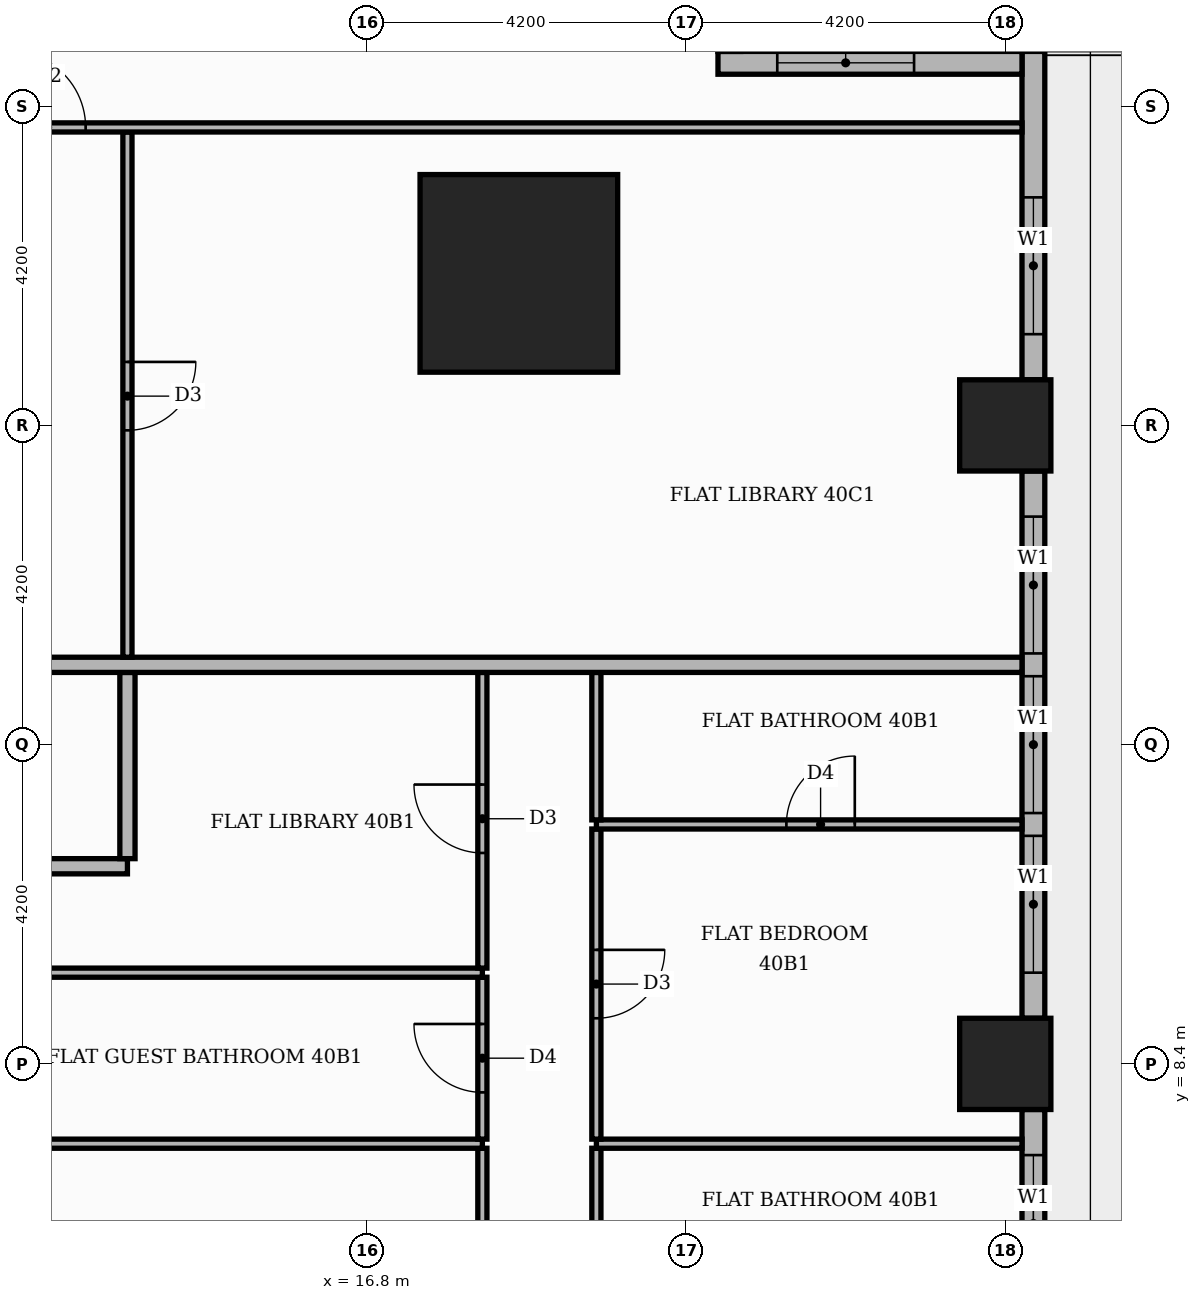
"""IFC4 building model, lengths in metres.
Left out: names, types, materials, properties, quantities, classifications, styles, units other than length and angle.
Written with IfcOpenShell. Run it as: python <this file> out.ifc"""

import sys

from ifc_helpers import new_model, si_unit, direction, frame, frame_2d, origin, origin_2d, place, context, subcontext, project, spatial, rectangle, extrude, element, fill, save


model = new_model("IFC4")
c1 = context("Model", 3, precision=1e-05, world=origin(), true_north=direction((0.0, 1.0)))
c2 = subcontext(c1, "Body", "Model", "MODEL_VIEW")
j1 = project(units=[si_unit("LENGTHUNIT", "METRE"), si_unit("PLANEANGLEUNIT", "RADIAN")], contexts=[c1])
p1 = place(None, origin())
s1 = spatial("IfcSite", under=j1, at=p1, CompositionType="ELEMENT")
p2 = place(p1, origin())
s2 = spatial("IfcBuilding", under=s1, at=p2, CompositionType="ELEMENT")
p3 = place(p2, frame((0.0, 0.0, 168.9)))
s3 = spatial("IfcBuildingStorey", under=s2, at=p3, CompositionType="ELEMENT", Elevation=168.9)
p4 = place(p3, frame((18.8, 18.8, 0.0), z_axis=(0.0, 0.0, 1.0), x_axis=(1.0, 0.0, 0.0)))
e1 = element("IfcColumn", 1, at=p4, inside=s3, PredefinedType="COLUMN", context=c2, shape_type="SweptSolid", body=[
    extrude(rectangle(XDim=2.6, YDim=2.6, at=origin_2d()), origin(), (0.0, 0.0, 1.0), 3.9),
])
for number, where, z_axis, x_axis in (
    (2, (25.2, 8.4, 0.0), (0.0, 0.0, 1.0), (1.0, 0.0, 0.0)),
    (3, (25.2, 16.8, 0.0), (0.0, 0.0, 1.0), (1.0, 0.0, 0.0)),
):
    element("IfcColumn", number, at=place(p3, frame(where, z_axis=z_axis, x_axis=x_axis)), inside=s3, PredefinedType="COLUMN", context=c2, shape_type="SweptSolid", body=[
        extrude(rectangle(XDim=1.2, YDim=1.2, at=origin_2d()), origin(), (0.0, 0.0, 1.0), 3.9),
    ])
p5 = place(p3, frame((25.57, 0.6, 0.0), z_axis=(0.0, 0.0, 1.0), x_axis=(0.0, 1.0, 0.0)))
e4 = element("IfcWall", 4, at=p5, inside=s3, PredefinedType="STANDARD", context=c2, shape_type="SweptSolid", body=[
    extrude(rectangle(XDim=7.2, YDim=0.3, at=frame_2d((3.6, 0.0))), origin(), (0.0, 0.0, 1.0), 3.48),
])
p6 = place(p5, frame((0.6, 0.0, 0.9)))
e5 = element("IfcOpeningElement", 5, at=p6, cuts=e4, PredefinedType="OPENING", context=c2, shape_type="SweptSolid", body=[
    extrude(rectangle(XDim=3.9, YDim=2.1, at=frame_2d((1.95, 1.05))), frame((0.0, 0.16, 0.0), z_axis=(0.0, -1.0, 0.0), x_axis=(1.0, 0.0, 0.0)), (0.0, 0.0, 1.0), 0.32),
])
p7 = place(p5, frame((4.8, 0.0, 0.9)))
e6 = element("IfcOpeningElement", 6, at=p7, cuts=e4, PredefinedType="OPENING", context=c2, shape_type="SweptSolid", body=[
    extrude(rectangle(XDim=1.8, YDim=2.1, at=frame_2d((0.9, 1.05))), frame((0.0, 0.16, 0.0), z_axis=(0.0, -1.0, 0.0), x_axis=(1.0, 0.0, 0.0)), (0.0, 0.0, 1.0), 0.32),
])
p8 = place(p3, frame((25.57, 9.0, 0.0), z_axis=(0.0, 0.0, 1.0), x_axis=(0.0, 1.0, 0.0)))
e7 = element("IfcWall", 7, at=p8, inside=s3, PredefinedType="STANDARD", context=c2, shape_type="SweptSolid", body=[
    extrude(rectangle(XDim=7.2, YDim=0.3, at=frame_2d((3.6, 0.0))), origin(), (0.0, 0.0, 1.0), 3.48),
])
p9 = place(p8, frame((0.6, 0.0, 0.9)))
e8 = element("IfcOpeningElement", 8, at=p9, cuts=e7, PredefinedType="OPENING", context=c2, shape_type="SweptSolid", body=[
    extrude(rectangle(XDim=1.8, YDim=2.1, at=frame_2d((0.9, 1.05))), frame((0.0, 0.16, 0.0), z_axis=(0.0, -1.0, 0.0), x_axis=(1.0, 0.0, 0.0)), (0.0, 0.0, 1.0), 0.32),
])
p10 = place(p8, frame((2.7, 0.0, 0.9)))
e9 = element("IfcOpeningElement", 9, at=p10, cuts=e7, PredefinedType="OPENING", context=c2, shape_type="SweptSolid", body=[
    extrude(rectangle(XDim=1.8, YDim=2.1, at=frame_2d((0.9, 1.05))), frame((0.0, 0.16, 0.0), z_axis=(0.0, -1.0, 0.0), x_axis=(1.0, 0.0, 0.0)), (0.0, 0.0, 1.0), 0.32),
])
p11 = place(p8, frame((4.8, 0.0, 0.9)))
e10 = element("IfcOpeningElement", 10, at=p11, cuts=e7, PredefinedType="OPENING", context=c2, shape_type="SweptSolid", body=[
    extrude(rectangle(XDim=1.8, YDim=2.1, at=frame_2d((0.9, 1.05))), frame((0.0, 0.16, 0.0), z_axis=(0.0, -1.0, 0.0), x_axis=(1.0, 0.0, 0.0)), (0.0, 0.0, 1.0), 0.32),
])
p12 = place(p3, frame((25.57, 17.4, 0.0), z_axis=(0.0, 0.0, 1.0), x_axis=(0.0, 1.0, 0.0)))
e11 = element("IfcWall", 11, at=p12, inside=s3, PredefinedType="STANDARD", context=c2, shape_type="SweptSolid", body=[
    extrude(rectangle(XDim=4.32, YDim=0.3, at=frame_2d((2.16, 0.0))), origin(), (0.0, 0.0, 1.0), 3.48),
])
p13 = place(p12, frame((0.6, 0.0, 0.9)))
e12 = element("IfcOpeningElement", 12, at=p13, cuts=e11, PredefinedType="OPENING", context=c2, shape_type="SweptSolid", body=[
    extrude(rectangle(XDim=1.8, YDim=2.1, at=frame_2d((0.9, 1.05))), frame((0.0, 0.16, 0.0), z_axis=(0.0, -1.0, 0.0), x_axis=(1.0, 0.0, 0.0)), (0.0, 0.0, 1.0), 0.32),
])
p14 = place(p3, frame((25.42, 21.57, 0.0), z_axis=(0.0, 0.0, 1.0), x_axis=(-1.0, 0.0, 0.0)))
e13 = element("IfcWall", 13, at=p14, inside=s3, PredefinedType="STANDARD", context=c2, shape_type="SweptSolid", body=[
    extrude(rectangle(XDim=4.0, YDim=0.3, at=frame_2d((2.0, 0.0))), origin(), (0.0, 0.0, 1.0), 3.48),
])
p15 = place(p14, frame((1.42, 0.0, 0.9)))
e14 = element("IfcOpeningElement", 14, at=p15, cuts=e13, PredefinedType="OPENING", context=c2, shape_type="SweptSolid", body=[
    extrude(rectangle(XDim=1.8, YDim=2.1, at=frame_2d((0.9, 1.05))), frame((0.0, 0.16, 0.0), z_axis=(0.0, -1.0, 0.0), x_axis=(1.0, 0.0, 0.0)), (0.0, 0.0, 1.0), 0.32),
])
p16 = place(p3, frame((18.32, 3.21, 0.0), z_axis=(0.0, 0.0, 1.0), x_axis=(0.0, 1.0, 0.0)))
e15 = element("IfcWall", 15, at=p16, inside=s3, PredefinedType="PARTITIONING", context=c2, shape_type="SweptSolid", body=[
    extrude(rectangle(XDim=4.08, YDim=0.12, at=frame_2d((2.04, 0.0))), origin(), (0.0, 0.0, 1.0), 3.48),
])
p17 = place(p16, frame((1.59, 0.0, 0.0)))
e16 = element("IfcOpeningElement", 16, at=p17, cuts=e15, PredefinedType="OPENING", context=c2, shape_type="SweptSolid", body=[
    extrude(rectangle(XDim=0.9, YDim=2.1, at=frame_2d((0.45, 1.05))), frame((0.0, 0.07, 0.0), z_axis=(0.0, -1.0, 0.0), x_axis=(1.0, 0.0, 0.0)), (0.0, 0.0, 1.0), 0.14),
])
p18 = place(p3, frame((19.82, 5.31, 0.0), z_axis=(0.0, 0.0, 1.0), x_axis=(0.0, 1.0, 0.0)))
e17 = element("IfcWall", 17, at=p18, inside=s3, PredefinedType="PARTITIONING", context=c2, shape_type="SweptSolid", body=[
    extrude(rectangle(XDim=1.98, YDim=0.12, at=frame_2d((0.99, 0.0))), origin(), (0.0, 0.0, 1.0), 3.48),
])
p19 = place(p3, frame((11.0, 7.35, 0.0), z_axis=(0.0, 0.0, 1.0), x_axis=(1.0, 0.0, 0.0)))
e18 = element("IfcWall", 18, at=p19, inside=s3, PredefinedType="PARTITIONING", context=c2, shape_type="SweptSolid", body=[
    extrude(rectangle(XDim=7.32, YDim=0.12, at=frame_2d((3.66, 0.0))), origin(), (0.0, 0.0, 1.0), 3.48),
])
p20 = place(p3, frame((19.82, 7.35, 0.0), z_axis=(0.0, 0.0, 1.0), x_axis=(1.0, 0.0, 0.0)))
e19 = element("IfcWall", 19, at=p20, inside=s3, PredefinedType="PARTITIONING", context=c2, shape_type="SweptSolid", body=[
    extrude(rectangle(XDim=5.6, YDim=0.12, at=frame_2d((2.8, 0.0))), origin(), (0.0, 0.0, 1.0), 3.48),
])
p21 = place(p3, frame((18.32, 7.41, 0.0), z_axis=(0.0, 0.0, 1.0), x_axis=(0.0, 1.0, 0.0)))
e20 = element("IfcWall", 20, at=p21, inside=s3, PredefinedType="PARTITIONING", context=c2, shape_type="SweptSolid", body=[
    extrude(rectangle(XDim=2.13, YDim=0.12, at=frame_2d((1.065, 0.0))), origin(), (0.0, 0.0, 1.0), 3.48),
])
p22 = place(p21, frame((0.615, 0.0, 0.0)))
e21 = element("IfcOpeningElement", 21, at=p22, cuts=e20, PredefinedType="OPENING", context=c2, shape_type="SweptSolid", body=[
    extrude(rectangle(XDim=0.9, YDim=2.1, at=frame_2d((0.45, 1.05))), frame((0.0, 0.07, 0.0), z_axis=(0.0, -1.0, 0.0), x_axis=(1.0, 0.0, 0.0)), (0.0, 0.0, 1.0), 0.14),
])
p23 = place(p3, frame((19.82, 7.41, 0.0), z_axis=(0.0, 0.0, 1.0), x_axis=(0.0, 1.0, 0.0)))
e22 = element("IfcWall", 22, at=p23, inside=s3, PredefinedType="PARTITIONING", context=c2, shape_type="SweptSolid", body=[
    extrude(rectangle(XDim=4.08, YDim=0.12, at=frame_2d((2.04, 0.0))), origin(), (0.0, 0.0, 1.0), 3.48),
])
p24 = place(p23, frame((1.59, 0.0, 0.0)))
e23 = element("IfcOpeningElement", 23, at=p24, cuts=e22, PredefinedType="OPENING", context=c2, shape_type="SweptSolid", body=[
    extrude(rectangle(XDim=0.9, YDim=2.1, at=frame_2d((0.45, 1.05))), frame((0.0, 0.07, 0.0), z_axis=(0.0, -1.0, 0.0), x_axis=(1.0, 0.0, 0.0)), (0.0, 0.0, 1.0), 0.14),
])
p25 = place(p3, frame((11.0, 9.6, 0.0), z_axis=(0.0, 0.0, 1.0), x_axis=(1.0, 0.0, 0.0)))
e24 = element("IfcWall", 24, at=p25, inside=s3, PredefinedType="PARTITIONING", context=c2, shape_type="SweptSolid", body=[
    extrude(rectangle(XDim=7.32, YDim=0.12, at=frame_2d((3.66, 0.0))), origin(), (0.0, 0.0, 1.0), 3.48),
])
p26 = place(p3, frame((18.32, 9.66, 0.0), z_axis=(0.0, 0.0, 1.0), x_axis=(0.0, 1.0, 0.0)))
e25 = element("IfcWall", 25, at=p26, inside=s3, PredefinedType="PARTITIONING", context=c2, shape_type="SweptSolid", body=[
    extrude(rectangle(XDim=3.89, YDim=0.12, at=frame_2d((1.945, 0.0))), origin(), (0.0, 0.0, 1.0), 3.48),
])
p27 = place(p26, frame((1.515, 0.0, 0.0)))
e26 = element("IfcOpeningElement", 26, at=p27, cuts=e25, PredefinedType="OPENING", context=c2, shape_type="SweptSolid", body=[
    extrude(rectangle(XDim=0.9, YDim=2.1, at=frame_2d((0.45, 1.05))), frame((0.0, 0.07, 0.0), z_axis=(0.0, -1.0, 0.0), x_axis=(1.0, 0.0, 0.0)), (0.0, 0.0, 1.0), 0.14),
])
p28 = place(p3, frame((11.0, 11.0, 0.0), z_axis=(0.0, 0.0, 1.0), x_axis=(1.0, 0.0, 0.0)))
e27 = element("IfcWall", 27, at=p28, inside=s3, PredefinedType="PARTITIONING", context=c2, shape_type="SweptSolid", body=[
    extrude(rectangle(XDim=2.65, YDim=0.2, at=frame_2d((1.325, 0.0))), origin(), (0.0, 0.0, 1.0), 3.48),
])
p29 = place(p3, frame((13.65, 11.1, 0.0), z_axis=(0.0, 0.0, 1.0), x_axis=(0.0, 1.0, 0.0)))
e28 = element("IfcWall", 28, at=p29, inside=s3, PredefinedType="PARTITIONING", context=c2, shape_type="SweptSolid", body=[
    extrude(rectangle(XDim=2.45, YDim=0.2, at=frame_2d((1.225, 0.0))), origin(), (0.0, 0.0, 1.0), 3.48),
])
p30 = place(p3, frame((19.82, 11.55, 0.0), z_axis=(0.0, 0.0, 1.0), x_axis=(1.0, 0.0, 0.0)))
e29 = element("IfcWall", 29, at=p30, inside=s3, PredefinedType="PARTITIONING", context=c2, shape_type="SweptSolid", body=[
    extrude(rectangle(XDim=5.6, YDim=0.12, at=frame_2d((2.8, 0.0))), origin(), (0.0, 0.0, 1.0), 3.48),
])
p31 = place(p30, frame((2.5, 0.0, 0.0)))
e30 = element("IfcOpeningElement", 30, at=p31, cuts=e29, PredefinedType="OPENING", context=c2, shape_type="SweptSolid", body=[
    extrude(rectangle(XDim=0.9, YDim=2.1, at=frame_2d((0.45, 1.05))), frame((0.0, 0.07, 0.0), z_axis=(0.0, -1.0, 0.0), x_axis=(1.0, 0.0, 0.0)), (0.0, 0.0, 1.0), 0.14),
])
p32 = place(p3, frame((19.82, 11.61, 0.0), z_axis=(0.0, 0.0, 1.0), x_axis=(0.0, 1.0, 0.0)))
e31 = element("IfcWall", 31, at=p32, inside=s3, PredefinedType="PARTITIONING", context=c2, shape_type="SweptSolid", body=[
    extrude(rectangle(XDim=1.94, YDim=0.12, at=frame_2d((0.97, 0.0))), origin(), (0.0, 0.0, 1.0), 3.48),
])
p33 = place(p3, frame((-13.65, 13.65, 0.0), z_axis=(0.0, 0.0, 1.0), x_axis=(1.0, 0.0, 0.0)))
e32 = element("IfcWall", 32, at=p33, inside=s3, PredefinedType="PARTITIONING", context=c2, shape_type="SweptSolid", body=[
    extrude(rectangle(XDim=39.07, YDim=0.2, at=frame_2d((19.535, 0.0))), origin(), (0.0, 0.0, 1.0), 3.48),
])
p34 = place(p33, frame((23.6, 0.0, 0.0)))
e33 = element("IfcOpeningElement", 33, at=p34, cuts=e32, PredefinedType="OPENING", context=c2, shape_type="SweptSolid", body=[
    extrude(rectangle(XDim=1.1, YDim=2.4, at=frame_2d((0.55, 1.2))), frame((0.0, 0.11, 0.0), z_axis=(0.0, -1.0, 0.0), x_axis=(1.0, 0.0, 0.0)), (0.0, 0.0, 1.0), 0.22),
])
p35 = place(p3, frame((13.65, 13.75, 0.0), z_axis=(0.0, 0.0, 1.0), x_axis=(0.0, 1.0, 0.0)))
e34 = element("IfcWall", 34, at=p35, inside=s3, PredefinedType="PARTITIONING", context=c2, shape_type="SweptSolid", body=[
    extrude(rectangle(XDim=6.91, YDim=0.12, at=frame_2d((3.455, 0.0))), origin(), (0.0, 0.0, 1.0), 3.48),
])
p36 = place(p35, frame((2.985, 0.0, 0.0)))
e35 = element("IfcOpeningElement", 35, at=p36, cuts=e34, PredefinedType="OPENING", context=c2, shape_type="SweptSolid", body=[
    extrude(rectangle(XDim=0.9, YDim=2.1, at=frame_2d((0.45, 1.05))), frame((0.0, 0.07, 0.0), z_axis=(0.0, -1.0, 0.0), x_axis=(1.0, 0.0, 0.0)), (0.0, 0.0, 1.0), 0.14),
])
p37 = place(p3, frame((11.85, 20.72, 0.0), z_axis=(0.0, 0.0, 1.0), x_axis=(1.0, 0.0, 0.0)))
e36 = element("IfcWall", 36, at=p37, inside=s3, PredefinedType="PARTITIONING", context=c2, shape_type="SweptSolid", body=[
    extrude(rectangle(XDim=13.57, YDim=0.12, at=frame_2d((6.785, 0.0))), origin(), (0.0, 0.0, 1.0), 3.48),
])
p38 = place(p37, frame((0.25, 0.0, 0.0)))
e37 = element("IfcOpeningElement", 37, at=p38, cuts=e36, PredefinedType="OPENING", context=c2, shape_type="SweptSolid", body=[
    extrude(rectangle(XDim=1.0, YDim=2.1, at=frame_2d((0.5, 1.05))), frame((0.0, 0.07, 0.0), z_axis=(0.0, -1.0, 0.0), x_axis=(1.0, 0.0, 0.0)), (0.0, 0.0, 1.0), 0.14),
])
p39 = place(p7, origin())
e38 = element("IfcWindow", 38, at=p39, inside=s3, PartitioningType="SINGLE_PANEL", PredefinedType="WINDOW", context=c2, shape_type="SweptSolid", body=[
    extrude(rectangle(XDim=1.8, YDim=2.1, at=frame_2d((0.9, 1.05))), frame((0.0, 0.03, 0.0), z_axis=(0.0, -1.0, 0.0), x_axis=(1.0, 0.0, 0.0)), (0.0, 0.0, 1.0), 0.06),
])
fill(e6, e38)
p40 = place(p9, origin())
e39 = element("IfcWindow", 39, at=p40, inside=s3, PartitioningType="SINGLE_PANEL", PredefinedType="WINDOW", context=c2, shape_type="SweptSolid", body=[
    extrude(rectangle(XDim=1.8, YDim=2.1, at=frame_2d((0.9, 1.05))), frame((0.0, 0.03, 0.0), z_axis=(0.0, -1.0, 0.0), x_axis=(1.0, 0.0, 0.0)), (0.0, 0.0, 1.0), 0.06),
])
fill(e8, e39)
p41 = place(p10, origin())
e40 = element("IfcWindow", 40, at=p41, inside=s3, PartitioningType="SINGLE_PANEL", PredefinedType="WINDOW", context=c2, shape_type="SweptSolid", body=[
    extrude(rectangle(XDim=1.8, YDim=2.1, at=frame_2d((0.9, 1.05))), frame((0.0, 0.03, 0.0), z_axis=(0.0, -1.0, 0.0), x_axis=(1.0, 0.0, 0.0)), (0.0, 0.0, 1.0), 0.06),
])
fill(e9, e40)
p42 = place(p11, origin())
e41 = element("IfcWindow", 41, at=p42, inside=s3, PartitioningType="SINGLE_PANEL", PredefinedType="WINDOW", context=c2, shape_type="SweptSolid", body=[
    extrude(rectangle(XDim=1.8, YDim=2.1, at=frame_2d((0.9, 1.05))), frame((0.0, 0.03, 0.0), z_axis=(0.0, -1.0, 0.0), x_axis=(1.0, 0.0, 0.0)), (0.0, 0.0, 1.0), 0.06),
])
fill(e10, e41)
p43 = place(p13, origin())
e42 = element("IfcWindow", 42, at=p43, inside=s3, PartitioningType="SINGLE_PANEL", PredefinedType="WINDOW", context=c2, shape_type="SweptSolid", body=[
    extrude(rectangle(XDim=1.8, YDim=2.1, at=frame_2d((0.9, 1.05))), frame((0.0, 0.03, 0.0), z_axis=(0.0, -1.0, 0.0), x_axis=(1.0, 0.0, 0.0)), (0.0, 0.0, 1.0), 0.06),
])
fill(e12, e42)
p44 = place(p15, origin())
e43 = element("IfcWindow", 43, at=p44, inside=s3, PartitioningType="SINGLE_PANEL", PredefinedType="WINDOW", context=c2, shape_type="SweptSolid", body=[
    extrude(rectangle(XDim=1.8, YDim=2.1, at=frame_2d((0.9, 1.05))), frame((0.0, 0.03, 0.0), z_axis=(0.0, -1.0, 0.0), x_axis=(1.0, 0.0, 0.0)), (0.0, 0.0, 1.0), 0.06),
])
fill(e14, e43)
p45 = place(p22, origin())
e44 = element("IfcDoor", 44, at=p45, inside=s3, OperationType="SINGLE_SWING_RIGHT", PredefinedType="DOOR", context=c2, shape_type="SweptSolid", body=[
    extrude(rectangle(XDim=0.9, YDim=2.1, at=frame_2d((0.45, 1.05))), frame((0.0, 0.025, 0.0), z_axis=(0.0, -1.0, 0.0), x_axis=(1.0, 0.0, 0.0)), (0.0, 0.0, 1.0), 0.05),
])
fill(e21, e44)
p46 = place(p27, origin())
e45 = element("IfcDoor", 45, at=p46, inside=s3, OperationType="SINGLE_SWING_RIGHT", PredefinedType="DOOR", context=c2, shape_type="SweptSolid", body=[
    extrude(rectangle(XDim=0.9, YDim=2.1, at=frame_2d((0.45, 1.05))), frame((0.0, 0.025, 0.0), z_axis=(0.0, -1.0, 0.0), x_axis=(1.0, 0.0, 0.0)), (0.0, 0.0, 1.0), 0.05),
])
fill(e26, e45)
p47 = place(p24, frame((0.9, 0.0, 0.0), z_axis=(0.0, 0.0, 1.0), x_axis=(-1.0, 0.0, 0.0)))
e46 = element("IfcDoor", 46, at=p47, inside=s3, OperationType="SINGLE_SWING_RIGHT", PredefinedType="DOOR", context=c2, shape_type="SweptSolid", body=[
    extrude(rectangle(XDim=0.9, YDim=2.1, at=frame_2d((0.45, 1.05))), frame((0.0, 0.025, 0.0), z_axis=(0.0, -1.0, 0.0), x_axis=(1.0, 0.0, 0.0)), (0.0, 0.0, 1.0), 0.05),
])
fill(e23, e46)
p48 = place(p31, origin())
e47 = element("IfcDoor", 47, at=p48, inside=s3, OperationType="SINGLE_SWING_RIGHT", PredefinedType="DOOR", context=c2, shape_type="SweptSolid", body=[
    extrude(rectangle(XDim=0.9, YDim=2.1, at=frame_2d((0.45, 1.05))), frame((0.0, 0.025, 0.0), z_axis=(0.0, -1.0, 0.0), x_axis=(1.0, 0.0, 0.0)), (0.0, 0.0, 1.0), 0.05),
])
fill(e30, e47)
p49 = place(p36, frame((0.9, 0.0, 0.0), z_axis=(0.0, 0.0, 1.0), x_axis=(-1.0, 0.0, 0.0)))
e48 = element("IfcDoor", 48, at=p49, inside=s3, OperationType="SINGLE_SWING_RIGHT", PredefinedType="DOOR", context=c2, shape_type="SweptSolid", body=[
    extrude(rectangle(XDim=0.9, YDim=2.1, at=frame_2d((0.45, 1.05))), frame((0.0, 0.025, 0.0), z_axis=(0.0, -1.0, 0.0), x_axis=(1.0, 0.0, 0.0)), (0.0, 0.0, 1.0), 0.05),
])
fill(e35, e48)
p50 = place(p38, origin())
e49 = element("IfcDoor", 49, at=p50, inside=s3, OperationType="SINGLE_SWING_LEFT", PredefinedType="DOOR", context=c2, shape_type="SweptSolid", body=[
    extrude(rectangle(XDim=1.0, YDim=2.1, at=frame_2d((0.5, 1.05))), frame((0.0, 0.025, 0.0), z_axis=(0.0, -1.0, 0.0), x_axis=(1.0, 0.0, 0.0)), (0.0, 0.0, 1.0), 0.05),
])
fill(e37, e49)
save(model, sys.argv[1])
